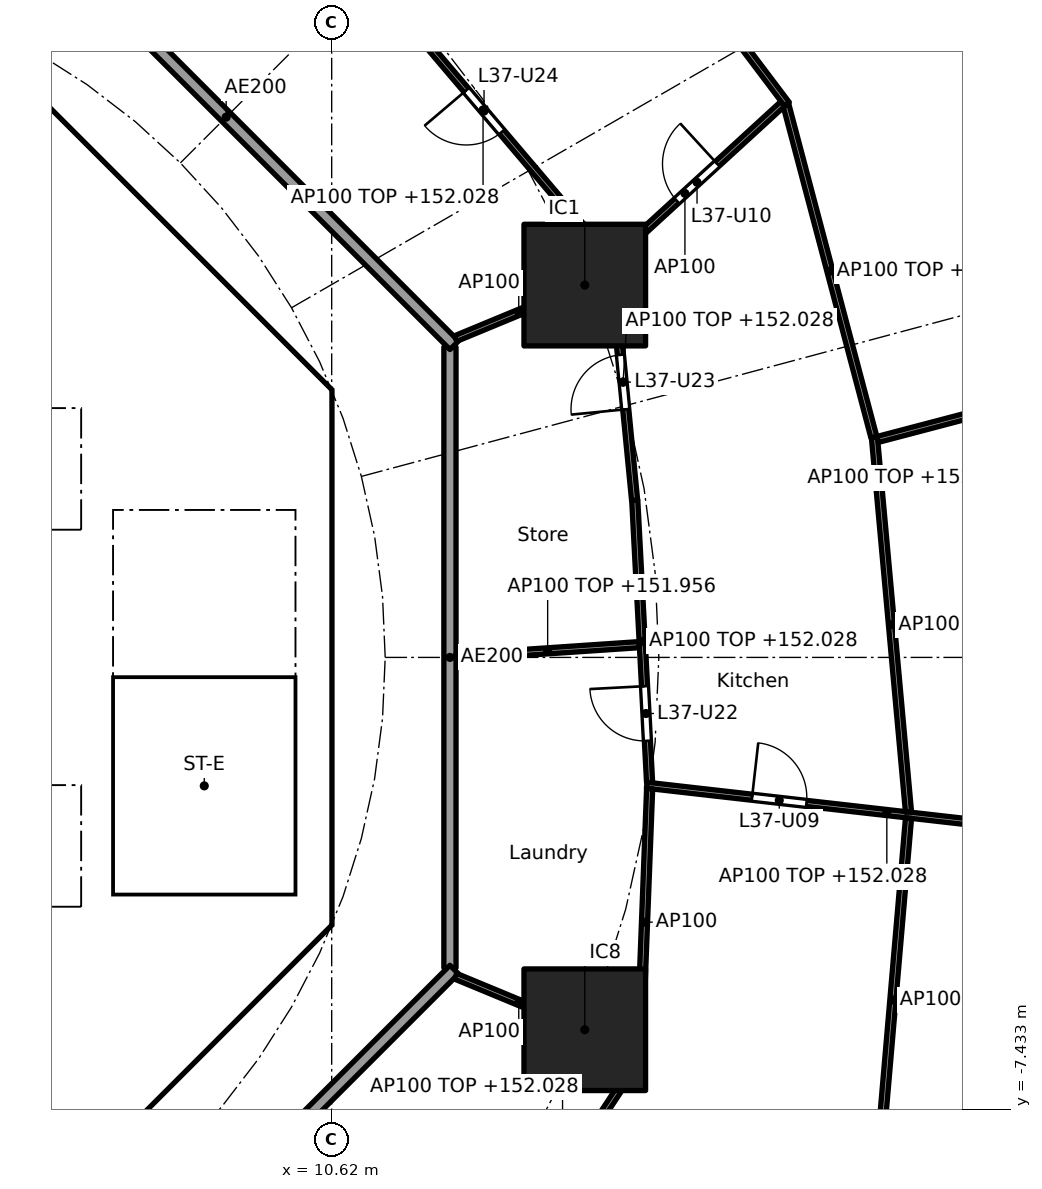
"""IFC4 building model, lengths in metres.
Left out: names, types, materials, properties, quantities, classifications, styles, units other than length and angle.
Written with IfcOpenShell. Run it as: python <this file> out.ifc"""

import sys

from ifc_helpers import new_model, si_unit, direction, frame, frame_2d, origin, origin_2d, place, context, subcontext, project, spatial, polyline, rectangle, outline, extrude, element, fill, save


model = new_model("IFC4")
c1 = context("Model", 3, precision=1e-05, world=origin(), true_north=direction((0.0, 1.0)))
c2 = subcontext(c1, "Body", "Model", "MODEL_VIEW")
j1 = project(units=[si_unit("LENGTHUNIT", "METRE"), si_unit("PLANEANGLEUNIT", "RADIAN")], contexts=[c1])
p1 = place(None, origin())
s1 = spatial("IfcSite", under=j1, at=p1, CompositionType="ELEMENT")
p2 = place(p1, origin())
s2 = spatial("IfcBuilding", under=s1, at=p2, CompositionType="ELEMENT")
p3 = place(p2, frame((0.0, 0.0, 149.2)))
s3 = spatial("IfcBuildingStorey", under=s2, at=p3, CompositionType="ELEMENT", Elevation=149.2)
for number, where, z_axis, x_axis in (
    (1, (14.782, 6.123, 0.0), (0.0, 0.0, 1.0), (1.0, 0.0, 0.0)),
    (2, (14.782, -6.123, 0.0), (0.0, 0.0, 1.0), (1.0, 0.0, 0.0)),
):
    element("IfcColumn", number, at=place(p3, frame(where, z_axis=z_axis, x_axis=x_axis)), inside=s3, PredefinedType="COLUMN", context=c2, shape_type="SweptSolid", body=[
        extrude(rectangle(XDim=2.0, YDim=2.0, at=origin_2d()), origin(), (0.0, 0.0, 1.0), 3.7),
    ])
p4 = place(p3, frame((9.988, 4.613, 0.0), z_axis=(0.0, 0.0, 1.0), x_axis=(-0.707106781187, 0.707106781187, 0.0)))
e3 = element("IfcWall", 3, at=p4, inside=s3, PredefinedType="SHEAR", context=c2, shape_type="SweptSolid", body=[
    extrude(rectangle(XDim=7.602, YDim=0.6, at=frame_2d((3.801, 0.0))), origin(), (0.0, 0.0, 1.0), 3.44),
])
p5 = place(p4, frame((3.201, 0.0, 0.0)))
e4 = element("IfcOpeningElement", 4, at=p5, cuts=e3, PredefinedType="OPENING", context=c2, shape_type="SweptSolid", body=[
    extrude(rectangle(XDim=1.2, YDim=2.1, at=frame_2d((0.6, 1.05))), frame((0.0, 0.31, 0.0), z_axis=(0.0, -1.0, 0.0), x_axis=(1.0, 0.0, 0.0)), (0.0, 0.0, 1.0), 0.62),
])
p6 = place(p3, frame((4.613, -9.988, 0.0), z_axis=(0.0, 0.0, 1.0), x_axis=(0.707106781187, 0.707106781187, 0.0)))
e5 = element("IfcWall", 5, at=p6, inside=s3, PredefinedType="SHEAR", context=c2, shape_type="SweptSolid", body=[
    extrude(rectangle(XDim=7.602, YDim=0.6, at=frame_2d((3.801, 0.0))), origin(), (0.0, 0.0, 1.0), 3.44),
])
p7 = place(p6, frame((3.201, 0.0, 0.0)))
e6 = element("IfcOpeningElement", 6, at=p7, cuts=e5, PredefinedType="OPENING", context=c2, shape_type="SweptSolid", body=[
    extrude(rectangle(XDim=1.2, YDim=2.1, at=frame_2d((0.6, 1.05))), frame((0.0, 0.31, 0.0), z_axis=(0.0, -1.0, 0.0), x_axis=(1.0, 0.0, 0.0)), (0.0, 0.0, 1.0), 0.62),
])
p8 = place(p3, frame((-6.7, 2.0, 0.0), z_axis=(0.0, 0.0, 1.0), x_axis=(1.0, 0.0, 0.0)))
e7 = element("IfcWall", 7, at=p8, inside=s3, PredefinedType="SOLIDWALL", context=c2, shape_type="SweptSolid", body=[
    extrude(rectangle(XDim=13.4, YDim=0.2, at=frame_2d((6.7, 0.0))), origin(), (0.0, 0.0, 1.0), 3.44),
])
p9 = place(p8, frame((0.65, 0.0, 0.0)))
e8 = element("IfcOpeningElement", 8, at=p9, cuts=e7, PredefinedType="OPENING", context=c2, shape_type="SweptSolid", body=[
    extrude(rectangle(XDim=1.1, YDim=2.1, at=frame_2d((0.55, 1.05))), frame((0.0, 0.11, 0.0), z_axis=(0.0, -1.0, 0.0), x_axis=(1.0, 0.0, 0.0)), (0.0, 0.0, 1.0), 0.22),
])
p10 = place(p8, frame((2.85, 0.0, 0.0)))
e9 = element("IfcOpeningElement", 9, at=p10, cuts=e7, PredefinedType="OPENING", context=c2, shape_type="SweptSolid", body=[
    extrude(rectangle(XDim=1.1, YDim=2.1, at=frame_2d((0.55, 1.05))), frame((0.0, 0.11, 0.0), z_axis=(0.0, -1.0, 0.0), x_axis=(1.0, 0.0, 0.0)), (0.0, 0.0, 1.0), 0.22),
])
p11 = place(p8, frame((5.05, 0.0, 0.0)))
e10 = element("IfcOpeningElement", 10, at=p11, cuts=e7, PredefinedType="OPENING", context=c2, shape_type="SweptSolid", body=[
    extrude(rectangle(XDim=1.1, YDim=2.1, at=frame_2d((0.55, 1.05))), frame((0.0, 0.11, 0.0), z_axis=(0.0, -1.0, 0.0), x_axis=(1.0, 0.0, 0.0)), (0.0, 0.0, 1.0), 0.22),
])
p12 = place(p3, frame((6.7, 4.0, 0.0), z_axis=(0.0, 0.0, 1.0), x_axis=(1.0, 0.0, 0.0)))
e11 = element("IfcWall", 11, at=p12, inside=s3, PredefinedType="SOLIDWALL", context=c2, shape_type="SweptSolid", body=[
    extrude(rectangle(XDim=3.325, YDim=0.2, at=frame_2d((1.662, 0.0))), origin(), (0.0, 0.0, 1.0), 3.44),
])
p13 = place(p12, frame((1.25, 0.0, 0.0)))
e12 = element("IfcOpeningElement", 12, at=p13, cuts=e11, PredefinedType="OPENING", context=c2, shape_type="SweptSolid", body=[
    extrude(rectangle(XDim=1.1, YDim=2.1, at=frame_2d((0.55, 1.05))), frame((0.0, 0.11, 0.0), z_axis=(0.0, -1.0, 0.0), x_axis=(1.0, 0.0, 0.0)), (0.0, 0.0, 1.0), 0.22),
])
p14 = place(p3, frame((-6.7, -2.0, 0.0), z_axis=(0.0, 0.0, 1.0), x_axis=(1.0, 0.0, 0.0)))
e13 = element("IfcWall", 13, at=p14, inside=s3, PredefinedType="SOLIDWALL", context=c2, shape_type="SweptSolid", body=[
    extrude(rectangle(XDim=13.4, YDim=0.2, at=frame_2d((6.7, 0.0))), origin(), (0.0, 0.0, 1.0), 3.44),
])
p15 = place(p14, frame((0.65, 0.0, 0.0)))
e14 = element("IfcOpeningElement", 14, at=p15, cuts=e13, PredefinedType="OPENING", context=c2, shape_type="SweptSolid", body=[
    extrude(rectangle(XDim=1.1, YDim=2.1, at=frame_2d((0.55, 1.05))), frame((0.0, 0.11, 0.0), z_axis=(0.0, -1.0, 0.0), x_axis=(1.0, 0.0, 0.0)), (0.0, 0.0, 1.0), 0.22),
])
p16 = place(p14, frame((2.85, 0.0, 0.0)))
e15 = element("IfcOpeningElement", 15, at=p16, cuts=e13, PredefinedType="OPENING", context=c2, shape_type="SweptSolid", body=[
    extrude(rectangle(XDim=1.1, YDim=2.1, at=frame_2d((0.55, 1.05))), frame((0.0, 0.11, 0.0), z_axis=(0.0, -1.0, 0.0), x_axis=(1.0, 0.0, 0.0)), (0.0, 0.0, 1.0), 0.22),
])
p17 = place(p3, origin())
e16 = element("IfcWall", 16, at=p17, inside=s3, PredefinedType="SHEAR", context=c2, shape_type="SweptSolid", body=[
    extrude(outline(polyline([(9.776, -4.401), (10.025, -4.152), (10.025, -3.801), (10.025, 4.152), (9.776, 4.401), (10.2, 4.825), (10.625, 4.401), (10.625, -4.401), (10.2, -4.825), (9.776, -4.401)])), origin(), (0.0, 0.0, 1.0), 3.44),
])
p18 = place(p3, origin())
e17 = element("IfcWall", 17, at=p18, inside=s3, PredefinedType="SOLIDWALL", context=c2, shape_type="SweptSolid", body=[
    extrude(outline(polyline([(-6.7, -2.1), (-6.5, -2.1), (-6.5, -4.1), (-4.5, -4.1), (-4.5, -2.1), (-4.3, -2.1), (-4.3, -4.1), (-2.3, -4.1), (-2.3, -2.1), (-2.1, -2.1), (-2.1, -4.1), (-0.1, -4.1), (-0.1, -2.1), (0.1, -2.1), (0.1, -4.1), (2.1, -4.1), (2.1, -2.1), (2.3, -2.1), (2.3, -4.1), (4.3, -4.1), (4.3, -2.1), (4.5, -2.1), (4.5, -4.1), (6.5, -4.1), (6.5, -2.1), (6.7, -2.1), (6.7, -4.3), (-6.7, -4.3), (-6.7, -2.1)])), origin(), (0.0, 0.0, 1.0), 3.44),
])
p19 = place(p3, origin())
e18 = element("IfcWall", 18, at=p19, inside=s3, PredefinedType="SOLIDWALL", context=c2, shape_type="SweptSolid", body=[
    extrude(outline(polyline([(-6.5, 2.1), (-6.7, 2.1), (-6.7, 4.3), (6.7, 4.3), (6.7, 2.1), (6.5, 2.1), (6.5, 4.1), (4.5, 4.1), (4.5, 2.1), (4.3, 2.1), (4.3, 4.1), (2.3, 4.1), (2.3, 2.1), (2.1, 2.1), (2.1, 4.1), (0.1, 4.1), (0.1, 2.1), (-0.1, 2.1), (-0.1, 4.1), (-2.1, 4.1), (-2.1, 2.1), (-2.3, 2.1), (-2.3, 4.1), (-4.3, 4.1), (-4.3, 2.1), (-4.5, 2.1), (-4.5, 4.1), (-6.5, 4.1), (-6.5, 2.1)])), origin(), (0.0, 0.0, 1.0), 3.44),
])
p20 = place(p3, origin())
e19 = element("IfcWall", 19, at=p20, inside=s3, PredefinedType="SOLIDWALL", context=c2, shape_type="SweptSolid", body=[
    extrude(outline(polyline([(7.025, -3.9), (6.7, -3.9), (6.7, 3.9), (7.025, 3.9), (7.025, -3.9)])), origin(), (0.0, 0.0, 1.0), 3.44),
])
p21 = place(p3, origin())
e20 = element("IfcWall", 20, at=p21, inside=s3, PredefinedType="SOLIDWALL", context=c2, shape_type="SweptSolid", body=[
    extrude(outline(polyline([(10.025, -4.1), (6.7, -4.1), (6.7, -3.9), (10.025, -3.9), (10.025, -4.1)])), origin(), (0.0, 0.0, 1.0), 3.44),
])
p22 = place(p3, frame((12.565, -5.104, 0.0), z_axis=(0.0, 0.0, 1.0), x_axis=(0.0, 1.0, 0.0)))
e21 = element("IfcWall", 21, at=p22, inside=s3, PredefinedType="PARTITIONING", context=c2, shape_type="SweptSolid", body=[
    extrude(rectangle(XDim=10.209, YDim=0.2, at=frame_2d((5.104, 0.0))), origin(), (0.0, 0.0, 1.0), 3.44),
])
p23 = place(p3, frame((12.635, 5.134, 0.0), z_axis=(0.0, 0.0, 1.0), x_axis=(-0.707106781187, 0.707106781187, 0.0)))
e22 = element("IfcWall", 22, at=p23, inside=s3, PredefinedType="PARTITIONING", context=c2, shape_type="SweptSolid", body=[
    extrude(rectangle(XDim=10.609, YDim=0.2, at=frame_2d((5.305, 0.0))), origin(), (0.0, 0.0, 1.0), 3.44),
])
p24 = place(p3, frame((5.275, -12.494, 0.0), z_axis=(0.0, 0.0, 1.0), x_axis=(0.707106781187, 0.707106781187, 0.0)))
e23 = element("IfcWall", 23, at=p24, inside=s3, PredefinedType="PARTITIONING", context=c2, shape_type="SweptSolid", body=[
    extrude(rectangle(XDim=10.409, YDim=0.2, at=frame_2d((5.205, 0.0))), origin(), (0.0, 0.0, 1.0), 3.44),
])
p25 = place(p3, frame((15.801, -2.103, 0.0), z_axis=(0.0, 0.0, 1.0), x_axis=(0.993607212763, -0.112892456544, 0.0)))
e24 = element("IfcWall", 24, at=p25, inside=s3, PredefinedType="PARTITIONING", context=c2, shape_type="SweptSolid", body=[
    extrude(rectangle(XDim=7.948, YDim=0.1, at=frame_2d((3.974, 0.0))), origin(), (0.0, 0.0, 1.0), 2.828),
])
p26 = place(p25, frame((1.743, 0.0, 0.0)))
e25 = element("IfcOpeningElement", 25, at=p26, cuts=e24, PredefinedType="OPENING", context=c2, shape_type="SweptSolid", body=[
    extrude(rectangle(XDim=0.9, YDim=2.1, at=frame_2d((0.45, 1.05))), frame((0.0, 0.06, 0.0), z_axis=(0.0, -1.0, 0.0), x_axis=(1.0, 0.0, 0.0)), (0.0, 0.0, 1.0), 0.12),
])
p27 = place(p25, frame((5.692, 0.0, 0.0)))
e26 = element("IfcOpeningElement", 26, at=p27, cuts=e24, PredefinedType="OPENING", context=c2, shape_type="SweptSolid", body=[
    extrude(rectangle(XDim=0.9, YDim=2.1, at=frame_2d((0.45, 1.05))), frame((0.0, 0.06, 0.0), z_axis=(0.0, -1.0, 0.0), x_axis=(1.0, 0.0, 0.0)), (0.0, 0.0, 1.0), 0.12),
])
p28 = place(p3, frame((15.848, -2.058, 0.0), z_axis=(0.0, 0.0, 1.0), x_axis=(-0.052509224895, 0.998620439056, 0.0)))
e27 = element("IfcWall", 27, at=p28, inside=s3, PredefinedType="PARTITIONING", context=c2, shape_type="SweptSolid", body=[
    extrude(rectangle(XDim=4.649, YDim=0.1, at=frame_2d((2.325, 0.0))), origin(), (0.0, 0.0, 1.0), 2.828),
])
p29 = place(p28, frame((0.687, 0.0, 0.0)))
e28 = element("IfcOpeningElement", 28, at=p29, cuts=e27, PredefinedType="OPENING", context=c2, shape_type="SweptSolid", body=[
    extrude(rectangle(XDim=0.9, YDim=2.1, at=frame_2d((0.45, 1.05))), frame((0.0, 0.06, 0.0), z_axis=(0.0, -1.0, 0.0), x_axis=(1.0, 0.0, 0.0)), (0.0, 0.0, 1.0), 0.12),
])
p30 = place(p3, frame((15.849, -2.158, 0.0), z_axis=(0.0, 0.0, 1.0), x_axis=(-0.038390448414, -0.999262815014, 0.0)))
e29 = element("IfcWall", 29, at=p30, inside=s3, PredefinedType="PARTITIONING", context=c2, shape_type="SweptSolid", body=[
    extrude(rectangle(XDim=4.394, YDim=0.1, at=frame_2d((2.197, 0.0))), origin(), (0.0, 0.0, 1.0), 3.44),
])
p31 = place(p3, frame((20.106, -2.542, 0.0), z_axis=(0.0, 0.0, 1.0), x_axis=(-0.090567755363, 0.995890296011, 0.0)))
e30 = element("IfcWall", 30, at=p31, inside=s3, PredefinedType="PARTITIONING", context=c2, shape_type="SweptSolid", body=[
    extrude(rectangle(XDim=6.189, YDim=0.1, at=frame_2d((3.095, 0.0))), origin(), (0.0, 0.0, 1.0), 2.828),
])
p32 = place(p3, frame((20.106, -2.642, 0.0), z_axis=(0.0, 0.0, 1.0), x_axis=(-0.085672025822, -0.996323393277, 0.0)))
e31 = element("IfcWall", 31, at=p32, inside=s3, PredefinedType="PARTITIONING", context=c2, shape_type="SweptSolid", body=[
    extrude(rectangle(XDim=6.007, YDim=0.1, at=frame_2d((3.003, 0.0))), origin(), (0.0, 0.0, 1.0), 2.828),
])
p33 = place(p3, frame((12.665, 0.007, 0.0), z_axis=(0.0, 0.0, 1.0), x_axis=(0.997736982365, 0.067237742534, 0.0)))
e32 = element("IfcWall", 32, at=p33, inside=s3, PredefinedType="PARTITIONING", context=c2, shape_type="SweptSolid", body=[
    extrude(rectangle(XDim=3.021, YDim=0.1, at=frame_2d((1.51, 0.0))), origin(), (0.0, 0.0, 1.0), 2.756),
])
p34 = place(p3, frame((15.602, 2.584, 0.0), z_axis=(0.0, 0.0, 1.0), x_axis=(-0.097207196705, 0.995264166394, 0.0)))
e33 = element("IfcWall", 33, at=p34, inside=s3, PredefinedType="PARTITIONING", context=c2, shape_type="SweptSolid", body=[
    extrude(rectangle(XDim=3.906, YDim=0.1, at=frame_2d((1.953, 0.0))), origin(), (0.0, 0.0, 1.0), 2.828),
])
p35 = place(p34, frame((1.503, 0.0, 0.0)))
e34 = element("IfcOpeningElement", 34, at=p35, cuts=e33, PredefinedType="OPENING", context=c2, shape_type="SweptSolid", body=[
    extrude(rectangle(XDim=0.9, YDim=2.1, at=frame_2d((0.45, 1.05))), frame((0.0, 0.06, 0.0), z_axis=(0.0, -1.0, 0.0), x_axis=(1.0, 0.0, 0.0)), (0.0, 0.0, 1.0), 0.12),
])
p36 = place(p3, frame((19.598, 3.584, 0.0), z_axis=(0.0, 0.0, 1.0), x_axis=(0.967108750962, 0.254363251695, 0.0)))
e35 = element("IfcWall", 35, at=p36, inside=s3, PredefinedType="PARTITIONING", context=c2, shape_type="SweptSolid", body=[
    extrude(rectangle(XDim=3.327, YDim=0.1, at=frame_2d((1.663, 0.0))), origin(), (0.0, 0.0, 1.0), 2.828),
])
p37 = place(p3, frame((19.537, 3.62, 0.0), z_axis=(0.0, 0.0, 1.0), x_axis=(-0.255892560316, 0.966705227862, 0.0)))
e36 = element("IfcWall", 36, at=p37, inside=s3, PredefinedType="PARTITIONING", context=c2, shape_type="SweptSolid", body=[
    extrude(rectangle(XDim=5.659, YDim=0.1, at=frame_2d((2.829, 0.0))), origin(), (0.0, 0.0, 1.0), 2.828),
])
p38 = place(p3, frame((12.657, 5.243, 0.0), z_axis=(0.0, 0.0, 1.0), x_axis=(0.923848837015, 0.382757529444, 0.0)))
e37 = element("IfcWall", 37, at=p38, inside=s3, PredefinedType="PARTITIONING", context=c2, shape_type="SweptSolid", body=[
    extrude(rectangle(XDim=2.25, YDim=0.1, at=frame_2d((1.125, 0.0))), origin(), (0.0, 0.0, 1.0), 3.44),
])
p39 = place(p3, frame((14.819, 6.157, 0.0), z_axis=(0.0, 0.0, 1.0), x_axis=(0.737620514432, 0.675215503887, 0.0)))
e38 = element("IfcWall", 38, at=p39, inside=s3, PredefinedType="PARTITIONING", context=c2, shape_type="SweptSolid", body=[
    extrude(rectangle(XDim=4.366, YDim=0.1, at=frame_2d((2.183, 0.0))), origin(), (0.0, 0.0, 1.0), 3.44),
])
p40 = place(p39, frame((2.003, 0.0, 0.0)))
e39 = element("IfcOpeningElement", 39, at=p40, cuts=e38, PredefinedType="OPENING", context=c2, shape_type="SweptSolid", body=[
    extrude(rectangle(XDim=0.9, YDim=2.1, at=frame_2d((0.45, 1.05))), frame((0.0, 0.06, 0.0), z_axis=(0.0, -1.0, 0.0), x_axis=(1.0, 0.0, 0.0)), (0.0, 0.0, 1.0), 0.12),
])
p41 = place(p3, frame((15.185, 6.559, 0.0), z_axis=(0.0, 0.0, 1.0), x_axis=(-0.647361044962, 0.762183493304, 0.0)))
e40 = element("IfcWall", 40, at=p41, inside=s3, PredefinedType="PARTITIONING", context=c2, shape_type="SweptSolid", body=[
    extrude(rectangle(XDim=6.413, YDim=0.1, at=frame_2d((3.207, 0.0))), origin(), (0.0, 0.0, 1.0), 2.828),
])
p42 = place(p41, frame((2.731, 0.0, 0.0)))
e41 = element("IfcOpeningElement", 41, at=p42, cuts=e40, PredefinedType="OPENING", context=c2, shape_type="SweptSolid", body=[
    extrude(rectangle(XDim=0.9, YDim=2.1, at=frame_2d((0.45, 1.05))), frame((0.0, 0.06, 0.0), z_axis=(0.0, -1.0, 0.0), x_axis=(1.0, 0.0, 0.0)), (0.0, 0.0, 1.0), 0.12),
])
p43 = place(p3, frame((18.106, 9.098, 0.0), z_axis=(0.0, 0.0, 1.0), x_axis=(-0.602398572907, 0.798195439325, 0.0)))
e42 = element("IfcWall", 42, at=p43, inside=s3, PredefinedType="PARTITIONING", context=c2, shape_type="SweptSolid", body=[
    extrude(rectangle(XDim=7.044, YDim=0.1, at=frame_2d((3.522, 0.0))), origin(), (0.0, 0.0, 1.0), 2.828),
])
p44 = place(p43, frame((3.072, 0.0, 0.0)))
e43 = element("IfcOpeningElement", 43, at=p44, cuts=e42, PredefinedType="OPENING", context=c2, shape_type="SweptSolid", body=[
    extrude(rectangle(XDim=0.9, YDim=2.1, at=frame_2d((0.45, 1.05))), frame((0.0, 0.06, 0.0), z_axis=(0.0, -1.0, 0.0), x_axis=(1.0, 0.0, 0.0)), (0.0, 0.0, 1.0), 0.12),
])
p45 = place(p3, frame((13.127, -10.467, 0.0), z_axis=(0.0, 0.0, 1.0), x_axis=(0.550614843759, 0.834759422727, 0.0)))
e44 = element("IfcWall", 44, at=p45, inside=s3, PredefinedType="PARTITIONING", context=c2, shape_type="SweptSolid", body=[
    extrude(rectangle(XDim=4.683, YDim=0.1, at=frame_2d((2.341, 0.0))), origin(), (0.0, 0.0, 1.0), 2.828),
])
p46 = place(p45, frame((1.866, 0.0, 0.0)))
e45 = element("IfcOpeningElement", 45, at=p46, cuts=e44, PredefinedType="OPENING", context=c2, shape_type="SweptSolid", body=[
    extrude(rectangle(XDim=0.9, YDim=2.1, at=frame_2d((0.45, 1.05))), frame((0.0, 0.06, 0.0), z_axis=(0.0, -1.0, 0.0), x_axis=(1.0, 0.0, 0.0)), (0.0, 0.0, 1.0), 0.12),
])
p47 = place(p3, frame((12.657, -5.243, 0.0), z_axis=(0.0, 0.0, 1.0), x_axis=(0.923864733477, -0.382719158442, 0.0)))
e46 = element("IfcWall", 46, at=p47, inside=s3, PredefinedType="PARTITIONING", context=c2, shape_type="SweptSolid", body=[
    extrude(rectangle(XDim=2.25, YDim=0.1, at=frame_2d((1.125, 0.0))), origin(), (0.0, 0.0, 1.0), 3.44),
])
p48 = place(p13, frame((1.1, 0.0, 0.0), x_axis=(-1.0, 0.0, 0.0)))
e47 = element("IfcDoor", 47, at=p48, inside=s3, OperationType="SINGLE_SWING_LEFT", PredefinedType="DOOR", context=c2, shape_type="SweptSolid", body=[
    extrude(rectangle(XDim=1.1, YDim=2.1, at=frame_2d((0.55, 1.05))), frame((0.0, 0.025, 0.0), z_axis=(0.0, -1.0, 0.0), x_axis=(1.0, 0.0, 0.0)), (0.0, 0.0, 1.0), 0.05),
])
fill(e12, e47)
p49 = place(p5, origin())
e48 = element("IfcDoor", 48, at=p49, inside=s3, OperationType="SINGLE_SWING_LEFT", PredefinedType="DOOR", context=c2, shape_type="SweptSolid", body=[
    extrude(rectangle(XDim=1.2, YDim=2.1, at=frame_2d((0.6, 1.05))), frame((0.0, 0.025, 0.0), z_axis=(0.0, -1.0, 0.0), x_axis=(1.0, 0.0, 0.0)), (0.0, 0.0, 1.0), 0.05),
])
fill(e4, e48)
p50 = place(p7, origin())
e49 = element("IfcDoor", 49, at=p50, inside=s3, OperationType="SINGLE_SWING_LEFT", PredefinedType="DOOR", context=c2, shape_type="SweptSolid", body=[
    extrude(rectangle(XDim=1.2, YDim=2.1, at=frame_2d((0.6, 1.05))), frame((0.0, 0.025, 0.0), z_axis=(0.0, -1.0, 0.0), x_axis=(1.0, 0.0, 0.0)), (0.0, 0.0, 1.0), 0.05),
])
fill(e6, e49)
p51 = place(p26, origin())
e50 = element("IfcDoor", 50, at=p51, inside=s3, OperationType="SINGLE_SWING_LEFT", PredefinedType="DOOR", context=c2, shape_type="SweptSolid", body=[
    extrude(rectangle(XDim=0.9, YDim=2.1, at=frame_2d((0.45, 1.05))), frame((0.0, 0.025, 0.0), z_axis=(0.0, -1.0, 0.0), x_axis=(1.0, 0.0, 0.0)), (0.0, 0.0, 1.0), 0.05),
])
fill(e25, e50)
p52 = place(p40, origin())
e51 = element("IfcDoor", 51, at=p52, inside=s3, OperationType="SINGLE_SWING_RIGHT", PredefinedType="DOOR", context=c2, shape_type="SweptSolid", body=[
    extrude(rectangle(XDim=0.9, YDim=2.1, at=frame_2d((0.45, 1.05))), frame((0.0, 0.025, 0.0), z_axis=(0.0, -1.0, 0.0), x_axis=(1.0, 0.0, 0.0)), (0.0, 0.0, 1.0), 0.05),
])
fill(e39, e51)
p53 = place(p29, origin())
e52 = element("IfcDoor", 52, at=p53, inside=s3, OperationType="SINGLE_SWING_RIGHT", PredefinedType="DOOR", context=c2, shape_type="SweptSolid", body=[
    extrude(rectangle(XDim=0.9, YDim=2.1, at=frame_2d((0.45, 1.05))), frame((0.0, 0.025, 0.0), z_axis=(0.0, -1.0, 0.0), x_axis=(1.0, 0.0, 0.0)), (0.0, 0.0, 1.0), 0.05),
])
fill(e28, e52)
p54 = place(p35, origin())
e53 = element("IfcDoor", 53, at=p54, inside=s3, OperationType="SINGLE_SWING_LEFT", PredefinedType="DOOR", context=c2, shape_type="SweptSolid", body=[
    extrude(rectangle(XDim=0.9, YDim=2.1, at=frame_2d((0.45, 1.05))), frame((0.0, 0.025, 0.0), z_axis=(0.0, -1.0, 0.0), x_axis=(1.0, 0.0, 0.0)), (0.0, 0.0, 1.0), 0.05),
])
fill(e34, e53)
p55 = place(p42, origin())
e54 = element("IfcDoor", 54, at=p55, inside=s3, OperationType="SINGLE_SWING_RIGHT", PredefinedType="DOOR", context=c2, shape_type="SweptSolid", body=[
    extrude(rectangle(XDim=0.9, YDim=2.1, at=frame_2d((0.45, 1.05))), frame((0.0, 0.025, 0.0), z_axis=(0.0, -1.0, 0.0), x_axis=(1.0, 0.0, 0.0)), (0.0, 0.0, 1.0), 0.05),
])
fill(e41, e54)
save(model, sys.argv[1])
